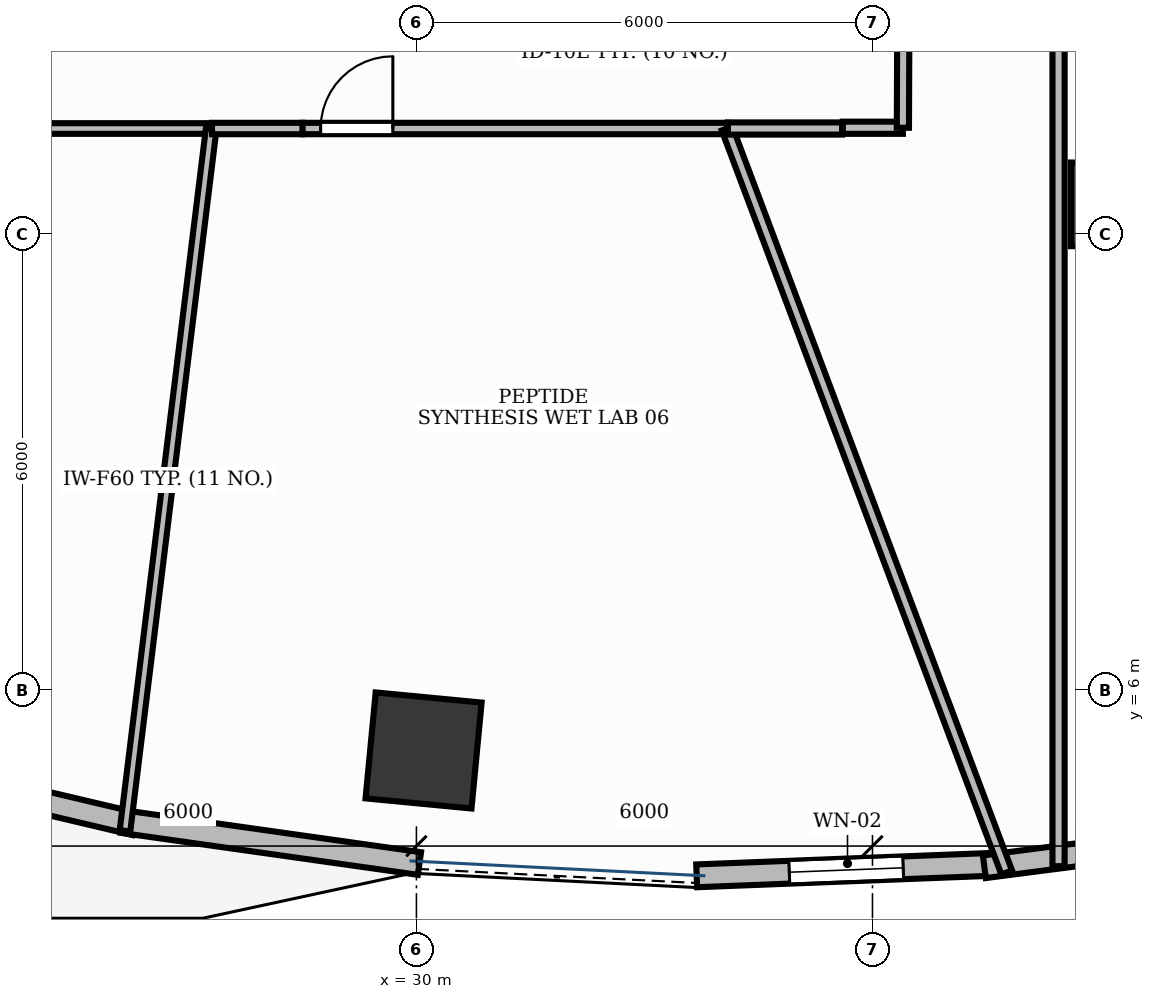
"""IFC4 building model, lengths in metres.
Left out: names, types, materials, properties, quantities, classifications, styles, units other than length and angle.
Written with IfcOpenShell. Run it as: python <this file> out.ifc"""

import sys

from ifc_helpers import new_model, si_unit, direction, frame, frame_2d, origin, origin_2d, place, context, subcontext, project, spatial, rectangle, extrude, element, fill, save


model = new_model("IFC4")
c1 = context("Model", 3, precision=1e-05, world=origin(), true_north=direction((0.0, 1.0)))
c2 = subcontext(c1, "Body", "Model", "MODEL_VIEW")
j1 = project(units=[si_unit("LENGTHUNIT", "METRE"), si_unit("PLANEANGLEUNIT", "RADIAN")], contexts=[c1])
p1 = place(None, origin())
s1 = spatial("IfcSite", under=j1, at=p1, CompositionType="ELEMENT")
p2 = place(p1, origin())
s2 = spatial("IfcBuilding", under=s1, at=p2, CompositionType="ELEMENT")
p3 = place(p2, frame((0.0, 0.0, 55.2)))
s3 = spatial("IfcBuildingStorey", under=s2, at=p3, CompositionType="ELEMENT", Elevation=55.2)
p4 = place(p3, frame((30.094, 5.208, -0.0), z_axis=(0.0, 0.0, 1.0), x_axis=(-0.995462868748, 0.095150811579, 0.0)))
e1 = element("IfcColumn", 1, at=p4, inside=s3, PredefinedType="COLUMN", context=c2, shape_type="SweptSolid", body=[
    extrude(rectangle(XDim=1.4, YDim=1.4, at=origin_2d()), origin(), (0.0, 0.0, 1.0), 3.901),
])
p5 = place(p3, frame((39.161, 12.392, -0.0), z_axis=(0.0, 0.0, 1.0), x_axis=(1.0, 0.0, 0.0)))
e2 = element("IfcColumn", 2, at=p5, inside=s3, PredefinedType="COLUMN", context=c2, shape_type="SweptSolid", body=[
    extrude(rectangle(XDim=1.1, YDim=1.1, at=origin_2d()), origin(), (0.0, 0.0, 1.0), 3.901),
])
p6 = place(p3, frame((33.687, 3.558, 0.0), z_axis=(0.0, 0.0, 1.0), x_axis=(0.999247008469, 0.038799691558, 0.0)))
e3 = element("IfcWall", 3, at=p6, inside=s3, PredefinedType="STANDARD", context=c2, shape_type="SweptSolid", body=[
    extrude(rectangle(XDim=3.939, YDim=0.3, at=frame_2d((1.969, 0.0))), origin(), (0.0, 0.0, 1.0), 3.9),
])
p7 = place(p6, frame((1.219, 0.0, 0.95)))
e4 = element("IfcOpeningElement", 4, at=p7, cuts=e3, PredefinedType="OPENING", context=c2, shape_type="SweptSolid", body=[
    extrude(rectangle(XDim=1.5, YDim=1.8, at=frame_2d((0.75, 0.9))), frame((0.0, 0.165, 0.0), z_axis=(0.0, -1.0, 0.0), x_axis=(1.0, 0.0, 0.0)), (0.0, 0.0, 1.0), 0.33),
])
p8 = place(p3, frame((22.5, 5.138, 0.0), z_axis=(0.0, 0.0, 1.0), x_axis=(0.973197600754, -0.229970497863, 0.0)))
e5 = element("IfcWall", 5, at=p8, inside=s3, PredefinedType="STANDARD", context=c2, shape_type="SweptSolid", body=[
    extrude(rectangle(XDim=3.901, YDim=0.3, at=frame_2d((1.951, 0.0))), origin(), (0.0, 0.0, 1.0), 3.9),
])
p9 = place(p3, frame((26.128, 4.273, 0.0), z_axis=(0.0, 0.0, 1.0), x_axis=(0.990165832998, -0.139898617443, 0.0)))
e6 = element("IfcWall", 6, at=p9, inside=s3, PredefinedType="STANDARD", context=c2, shape_type="SweptSolid", body=[
    extrude(rectangle(XDim=3.951, YDim=0.3, at=frame_2d((1.976, 0.0))), origin(), (0.0, 0.0, 1.0), 3.47),
])
p10 = place(p3, frame((37.472, 3.678, 0.0), z_axis=(0.0, 0.0, 1.0), x_axis=(0.991734095036, 0.128310111617, 0.0)))
e7 = element("IfcWall", 7, at=p10, inside=s3, PredefinedType="STANDARD", context=c2, shape_type="SweptSolid", body=[
    extrude(rectangle(XDim=3.956, YDim=0.3, at=frame_2d((1.978, 0.0))), origin(), (0.0, 0.0, 1.0), 3.9),
])
p11 = place(p3, frame((21.8, 13.39, 0.0), z_axis=(0.0, 0.0, 1.0), x_axis=(1.0, 0.0, 0.0)))
e8 = element("IfcWall", 8, at=p11, inside=s3, PredefinedType="PARTITIONING", context=c2, shape_type="SweptSolid", body=[
    extrude(rectangle(XDim=5.5, YDim=0.14, at=frame_2d((2.75, 0.0))), origin(), (0.0, 0.0, 1.0), 2.91),
])
p12 = place(p11, frame((0.24, 0.0, 0.0)))
e9 = element("IfcOpeningElement", 9, at=p12, cuts=e8, PredefinedType="OPENING", context=c2, shape_type="SweptSolid", body=[
    extrude(rectangle(XDim=0.95, YDim=2.15, at=frame_2d((0.475, 1.075))), frame((0.0, 0.085, 0.0), z_axis=(0.0, -1.0, 0.0), x_axis=(1.0, 0.0, 0.0)), (0.0, 0.0, 1.0), 0.17),
])
p13 = place(p3, frame((28.5, 13.39, 0.0), z_axis=(0.0, 0.0, 1.0), x_axis=(1.0, 0.0, 0.0)))
e10 = element("IfcWall", 10, at=p13, inside=s3, PredefinedType="PARTITIONING", context=c2, shape_type="SweptSolid", body=[
    extrude(rectangle(XDim=5.587, YDim=0.15, at=frame_2d((2.793, 0.0))), origin(), (0.0, 0.0, 1.0), 2.91),
])
p14 = place(p13, frame((0.24, 0.0, 0.0)))
e11 = element("IfcOpeningElement", 11, at=p14, cuts=e10, PredefinedType="OPENING", context=c2, shape_type="SweptSolid", body=[
    extrude(rectangle(XDim=0.95, YDim=2.15, at=frame_2d((0.475, 1.075))), frame((0.0, 0.09, 0.0), z_axis=(0.0, -1.0, 0.0), x_axis=(1.0, 0.0, 0.0)), (0.0, 0.0, 1.0), 0.18),
])
p15 = place(p3, frame((27.301, 13.39, 0.0), z_axis=(0.0, 0.0, 1.0), x_axis=(-0.121878156066, -0.992545069543, 0.0)))
e12 = element("IfcWall", 12, at=p15, inside=s3, PredefinedType="PARTITIONING", context=c2, shape_type="SweptSolid", body=[
    extrude(rectangle(XDim=9.309, YDim=0.14, at=frame_2d((4.654, 0.0))), origin(), (0.0, 0.0, 1.0), 2.91),
])
p16 = place(p3, frame((27.311, 13.39, 0.0), z_axis=(0.0, 0.0, 1.0), x_axis=(1.0, 0.0, 0.0)))
e13 = element("IfcWall", 13, at=p16, inside=s3, PredefinedType="PARTITIONING", context=c2, shape_type="SweptSolid", body=[
    extrude(rectangle(XDim=1.189, YDim=0.15, at=frame_2d((0.595, 0.0))), origin(), (0.0, 0.0, 1.0), 2.91),
])
p17 = place(p3, frame((34.087, 13.39, 0.0), z_axis=(0.0, 0.0, 1.0), x_axis=(0.351837225237, -0.936061198286, 0.0)))
e14 = element("IfcWall", 14, at=p17, inside=s3, PredefinedType="PARTITIONING", context=c2, shape_type="SweptSolid", body=[
    extrude(rectangle(XDim=10.456, YDim=0.15, at=frame_2d((5.228, 0.0))), origin(), (0.0, 0.0, 1.0), 2.91),
])
p18 = place(p3, frame((38.448, 17.198, 0.0), z_axis=(0.0, 0.0, 1.0), x_axis=(0.0, -1.0, 0.0)))
e15 = element("IfcWall", 15, at=p18, inside=s3, PredefinedType="PARTITIONING", context=c2, shape_type="SweptSolid", body=[
    extrude(rectangle(XDim=13.513, YDim=0.16, at=frame_2d((6.756, 0.0))), origin(), (0.0, 0.0, 1.0), 2.91),
])
p19 = place(p3, frame((34.098, 13.39, 0.0), z_axis=(0.0, 0.0, 1.0), x_axis=(1.0, 0.0, 0.0)))
e16 = element("IfcWall", 16, at=p19, inside=s3, PredefinedType="PARTITIONING", context=c2, shape_type="SweptSolid", body=[
    extrude(rectangle(XDim=1.502, YDim=0.16, at=frame_2d((0.751, 0.0))), origin(), (0.0, 0.0, 1.0), 2.91),
])
p20 = place(p3, frame((35.61, 13.4, 0.0), z_axis=(0.0, 0.0, 1.0), x_axis=(1.0, 0.0, 0.0)))
e17 = element("IfcWall", 17, at=p20, inside=s3, PredefinedType="PARTITIONING", context=c2, shape_type="SweptSolid", body=[
    extrude(rectangle(XDim=0.79, YDim=0.16, at=frame_2d((0.395, 0.0))), origin(), (0.0, 0.0, 1.0), 2.91),
])
p21 = place(p3, frame((36.4, 13.4, 0.0), z_axis=(0.0, 0.0, 1.0), x_axis=(0.004085258855, 0.999991655295, 0.0)))
e18 = element("IfcWall", 18, at=p21, inside=s3, PredefinedType="PARTITIONING", context=c2, shape_type="SweptSolid", body=[
    extrude(rectangle(XDim=2.45, YDim=0.16, at=frame_2d((1.225, 0.0))), origin(), (0.0, 0.0, 1.0), 2.91),
])
p22 = place(p7, origin())
e19 = element("IfcWindow", 19, at=p22, inside=s3, PartitioningType="DOUBLE_PANEL_VERTICAL", PredefinedType="WINDOW", context=c2, shape_type="SweptSolid", body=[
    extrude(rectangle(XDim=1.5, YDim=1.8, at=frame_2d((0.75, 0.9))), frame((0.0, 0.03, 0.0), z_axis=(0.0, -1.0, 0.0), x_axis=(1.0, 0.0, 0.0)), (0.0, 0.0, 1.0), 0.06),
])
fill(e4, e19)
p23 = place(p14, origin())
e20 = element("IfcDoor", 20, at=p23, inside=s3, OperationType="SINGLE_SWING_RIGHT", PredefinedType="DOOR", context=c2, shape_type="SweptSolid", body=[
    extrude(rectangle(XDim=0.95, YDim=2.15, at=frame_2d((0.475, 1.075))), frame((0.0, 0.025, 0.0), z_axis=(0.0, -1.0, 0.0), x_axis=(1.0, 0.0, 0.0)), (0.0, 0.0, 1.0), 0.05),
])
fill(e11, e20)
save(model, sys.argv[1])
